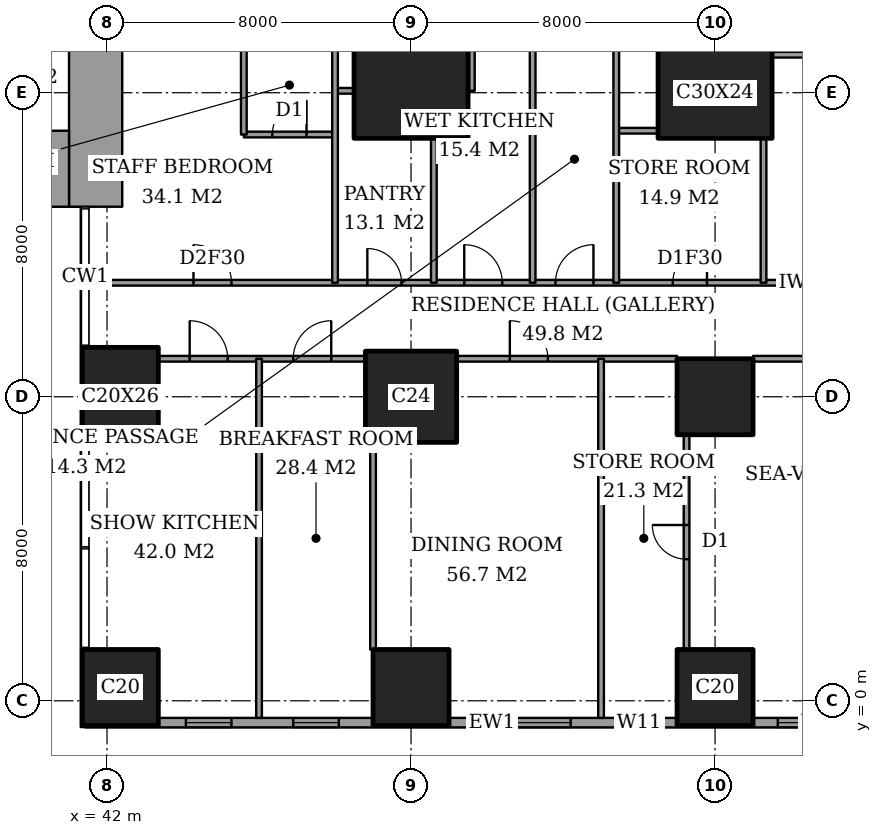
"""IFC4 building model, lengths in metres.
Left out: names, types, materials, properties, quantities, classifications, styles, units other than length and angle.
Written with IfcOpenShell. Run it as: python <this file> out.ifc"""

import sys

from ifc_helpers import new_model, si_unit, direction, frame, frame_2d, origin, origin_2d, place, context, subcontext, project, spatial, rectangle, extrude, element, fill, save


model = new_model("IFC4")
c1 = context("Model", 3, precision=1e-05, world=origin(), true_north=direction((0.0, 1.0)))
c2 = subcontext(c1, "Body", "Model", "MODEL_VIEW")
j1 = project(units=[si_unit("LENGTHUNIT", "METRE"), si_unit("PLANEANGLEUNIT", "RADIAN")], contexts=[c1])
p1 = place(None, origin())
s1 = spatial("IfcSite", under=j1, at=p1, CompositionType="ELEMENT")
p2 = place(p1, origin())
s2 = spatial("IfcBuilding", under=s1, at=p2, CompositionType="ELEMENT")
p3 = place(p2, frame((0.0, 0.0, 168.2)))
s3 = spatial("IfcBuildingStorey", under=s2, at=p3, CompositionType="ELEMENT", Elevation=168.2)
p4 = place(p3, frame((42.35, 0.35, 0.0), z_axis=(0.0, 0.0, 1.0), x_axis=(1.0, 0.0, 0.0)))
e1 = element("IfcColumn", 1, at=p4, inside=s3, PredefinedType="COLUMN", context=c2, shape_type="SweptSolid", body=[
    extrude(rectangle(XDim=2.0, YDim=2.0, at=origin_2d()), origin(), (0.0, 0.0, 1.0), 3.6),
])
p5 = place(p3, frame((42.35, 8.0, 0.0), z_axis=(0.0, 0.0, 1.0), x_axis=(1.0, 0.0, 0.0)))
e2 = element("IfcColumn", 2, at=p5, inside=s3, PredefinedType="COLUMN", context=c2, shape_type="SweptSolid", body=[
    extrude(rectangle(XDim=2.0, YDim=2.6, at=origin_2d()), origin(), (0.0, 0.0, 1.0), 3.6),
])
p6 = place(p3, frame((50.0, 0.35, 0.0), z_axis=(0.0, 0.0, 1.0), x_axis=(1.0, 0.0, 0.0)))
e3 = element("IfcColumn", 3, at=p6, inside=s3, PredefinedType="COLUMN", context=c2, shape_type="SweptSolid", body=[
    extrude(rectangle(XDim=2.0, YDim=2.0, at=origin_2d()), origin(), (0.0, 0.0, 1.0), 3.6),
])
p7 = place(p3, frame((50.0, 8.0, 0.0), z_axis=(0.0, 0.0, 1.0), x_axis=(1.0, 0.0, 0.0)))
e4 = element("IfcColumn", 4, at=p7, inside=s3, PredefinedType="COLUMN", context=c2, shape_type="SweptSolid", body=[
    extrude(rectangle(XDim=2.4, YDim=2.4, at=origin_2d()), origin(), (0.0, 0.0, 1.0), 3.6),
])
p8 = place(p3, frame((50.0, 16.0, 0.0), z_axis=(0.0, 0.0, 1.0), x_axis=(1.0, 0.0, 0.0)))
e5 = element("IfcColumn", 5, at=p8, inside=s3, PredefinedType="COLUMN", context=c2, shape_type="SweptSolid", body=[
    extrude(rectangle(XDim=3.0, YDim=2.4, at=origin_2d()), origin(), (0.0, 0.0, 1.0), 3.6),
])
for number, where, z_axis, x_axis in (
    (6, (58.0, 0.35, 0.0), (0.0, 0.0, 1.0), (1.0, 0.0, 0.0)),
    (7, (58.0, 8.0, 0.0), (0.0, 0.0, 1.0), (1.0, 0.0, 0.0)),
):
    element("IfcColumn", number, at=place(p3, frame(where, z_axis=z_axis, x_axis=x_axis)), inside=s3, PredefinedType="COLUMN", context=c2, shape_type="SweptSolid", body=[
        extrude(rectangle(XDim=2.0, YDim=2.0, at=origin_2d()), origin(), (0.0, 0.0, 1.0), 3.6),
    ])
p9 = place(p3, frame((58.0, 16.0, 0.0), z_axis=(0.0, 0.0, 1.0), x_axis=(1.0, 0.0, 0.0)))
e8 = element("IfcColumn", 8, at=p9, inside=s3, PredefinedType="COLUMN", context=c2, shape_type="SweptSolid", body=[
    extrude(rectangle(XDim=3.0, YDim=2.4, at=origin_2d()), origin(), (0.0, 0.0, 1.0), 3.6),
])
p10 = place(p3, frame((37.85, 14.0, 0.0), z_axis=(0.0, 0.0, 1.0), x_axis=(1.0, 0.0, 0.0)))
e9 = element("IfcWall", 9, at=p10, inside=s3, PredefinedType="SHEAR", context=c2, shape_type="SweptSolid", body=[
    extrude(rectangle(XDim=3.15, YDim=2.0, at=frame_2d((1.575, 0.0))), origin(), (0.0, 0.0, 1.0), 3.6),
])
p11 = place(p3, frame((41.7, 13.0, 0.0), z_axis=(0.0, 0.0, 1.0), x_axis=(0.0, 1.0, 0.0)))
e10 = element("IfcWall", 10, at=p11, inside=s3, PredefinedType="SHEAR", context=c2, shape_type="SweptSolid", body=[
    extrude(rectangle(XDim=11.85, YDim=1.4, at=frame_2d((5.925, 0.0))), origin(), (0.0, 0.0, 1.0), 3.6),
])
p12 = place(p11, frame((7.5, 0.0, 0.0)))
e11 = element("IfcOpeningElement", 11, at=p12, cuts=e10, PredefinedType="OPENING", context=c2, shape_type="SweptSolid", body=[
    extrude(rectangle(XDim=1.8, YDim=2.4, at=frame_2d((0.9, 1.2))), frame((0.0, 0.71, 0.0), z_axis=(0.0, -1.0, 0.0), x_axis=(1.0, 0.0, 0.0)), (0.0, 0.0, 1.0), 1.42),
])
p13 = place(p3, frame((41.425, -0.575, 0.0), z_axis=(0.0, 0.0, 1.0), x_axis=(1.0, 0.0, 0.0)))
e12 = element("IfcWall", 12, at=p13, inside=s3, PredefinedType="SOLIDWALL", context=c2, shape_type="SweptSolid", body=[
    extrude(rectangle(XDim=21.4, YDim=0.25, at=frame_2d((10.7, 0.0))), origin(), (0.0, 0.0, 1.0), 3.6),
])
p14 = place(p13, frame((2.65, 0.0, 0.4)))
e13 = element("IfcOpeningElement", 13, at=p14, cuts=e12, PredefinedType="OPENING", context=c2, shape_type="SweptSolid", body=[
    extrude(rectangle(XDim=1.2, YDim=2.2, at=frame_2d((0.6, 1.1))), frame((0.0, 0.135, 0.0), z_axis=(0.0, -1.0, 0.0), x_axis=(1.0, 0.0, 0.0)), (0.0, 0.0, 1.0), 0.27),
])
p15 = place(p13, frame((5.475, 0.0, 0.4)))
e14 = element("IfcOpeningElement", 14, at=p15, cuts=e12, PredefinedType="OPENING", context=c2, shape_type="SweptSolid", body=[
    extrude(rectangle(XDim=1.2, YDim=2.2, at=frame_2d((0.6, 1.1))), frame((0.0, 0.135, 0.0), z_axis=(0.0, -1.0, 0.0), x_axis=(1.0, 0.0, 0.0)), (0.0, 0.0, 1.0), 0.27),
])
p16 = place(p13, frame((10.375, 0.0, 0.4)))
e15 = element("IfcOpeningElement", 15, at=p16, cuts=e12, PredefinedType="OPENING", context=c2, shape_type="SweptSolid", body=[
    extrude(rectangle(XDim=2.4, YDim=2.2, at=frame_2d((1.2, 1.1))), frame((0.0, 0.135, 0.0), z_axis=(0.0, -1.0, 0.0), x_axis=(1.0, 0.0, 0.0)), (0.0, 0.0, 1.0), 0.27),
])
p17 = place(p13, frame((13.975, 0.0, 0.4)))
e16 = element("IfcOpeningElement", 16, at=p17, cuts=e12, PredefinedType="OPENING", context=c2, shape_type="SweptSolid", body=[
    extrude(rectangle(XDim=1.2, YDim=2.2, at=frame_2d((0.6, 1.1))), frame((0.0, 0.135, 0.0), z_axis=(0.0, -1.0, 0.0), x_axis=(1.0, 0.0, 0.0)), (0.0, 0.0, 1.0), 0.27),
])
p18 = place(p13, frame((18.225, 0.0, 0.4)))
e17 = element("IfcOpeningElement", 17, at=p18, cuts=e12, PredefinedType="OPENING", context=c2, shape_type="SweptSolid", body=[
    extrude(rectangle(XDim=2.4, YDim=2.2, at=frame_2d((1.2, 1.1))), frame((0.0, 0.135, 0.0), z_axis=(0.0, -1.0, 0.0), x_axis=(1.0, 0.0, 0.0)), (0.0, 0.0, 1.0), 0.27),
])
p19 = place(p3, frame((43.35, 9.0, 0.0), z_axis=(0.0, 0.0, 1.0), x_axis=(1.0, 0.0, 0.0)))
e18 = element("IfcWall", 18, at=p19, inside=s3, PredefinedType="PARTITIONING", context=c2, shape_type="SweptSolid", body=[
    extrude(rectangle(XDim=5.45, YDim=0.15, at=frame_2d((2.725, 0.0))), origin(), (0.0, 0.0, 1.0), 3.25),
])
p20 = place(p19, frame((3.55, 0.0, 0.0)))
e19 = element("IfcOpeningElement", 19, at=p20, cuts=e18, PredefinedType="OPENING", context=c2, shape_type="SweptSolid", body=[
    extrude(rectangle(XDim=1.0, YDim=2.1, at=frame_2d((0.5, 1.05))), frame((0.0, 0.085, 0.0), z_axis=(0.0, -1.0, 0.0), x_axis=(1.0, 0.0, 0.0)), (0.0, 0.0, 1.0), 0.17),
])
p21 = place(p19, frame((0.825, 0.0, 0.0)))
e20 = element("IfcOpeningElement", 20, at=p21, cuts=e18, PredefinedType="OPENING", context=c2, shape_type="SweptSolid", body=[
    extrude(rectangle(XDim=1.0, YDim=2.1, at=frame_2d((0.5, 1.05))), frame((0.0, 0.085, 0.0), z_axis=(0.0, -1.0, 0.0), x_axis=(1.0, 0.0, 0.0)), (0.0, 0.0, 1.0), 0.17),
])
p22 = place(p3, frame((51.2, 9.0, 0.0), z_axis=(0.0, 0.0, 1.0), x_axis=(1.0, 0.0, 0.0)))
e21 = element("IfcWall", 21, at=p22, inside=s3, PredefinedType="PARTITIONING", context=c2, shape_type="SweptSolid", body=[
    extrude(rectangle(XDim=5.8, YDim=0.15, at=frame_2d((2.9, 0.0))), origin(), (0.0, 0.0, 1.0), 3.25),
])
p23 = place(p22, frame((1.4, 0.0, 0.0)))
e22 = element("IfcOpeningElement", 22, at=p23, cuts=e21, PredefinedType="OPENING", context=c2, shape_type="SweptSolid", body=[
    extrude(rectangle(XDim=1.0, YDim=2.1, at=frame_2d((0.5, 1.05))), frame((0.0, 0.085, 0.0), z_axis=(0.0, -1.0, 0.0), x_axis=(1.0, 0.0, 0.0)), (0.0, 0.0, 1.0), 0.17),
])
p24 = place(p3, frame((59.0, 9.0, 0.0), z_axis=(0.0, 0.0, 1.0), x_axis=(1.0, 0.0, 0.0)))
e23 = element("IfcWall", 23, at=p24, inside=s3, PredefinedType="PARTITIONING", context=c2, shape_type="SweptSolid", body=[
    extrude(rectangle(XDim=5.65, YDim=0.15, at=frame_2d((2.825, 0.0))), origin(), (0.0, 0.0, 1.0), 3.25),
])
p25 = place(p24, frame((2.325, 0.0, 0.0)))
e24 = element("IfcOpeningElement", 24, at=p25, cuts=e23, PredefinedType="OPENING", context=c2, shape_type="SweptSolid", body=[
    extrude(rectangle(XDim=1.0, YDim=2.1, at=frame_2d((0.5, 1.05))), frame((0.0, 0.085, 0.0), z_axis=(0.0, -1.0, 0.0), x_axis=(1.0, 0.0, 0.0)), (0.0, 0.0, 1.0), 0.17),
])
p26 = place(p3, frame((41.439, 11.0, 0.0), z_axis=(0.0, 0.0, 1.0), x_axis=(1.0, 0.0, 0.0)))
e25 = element("IfcWall", 25, at=p26, inside=s3, PredefinedType="PARTITIONING", context=c2, shape_type="SweptSolid", body=[
    extrude(rectangle(XDim=25.011, YDim=0.15, at=frame_2d((12.505, 0.0))), origin(), (0.0, 0.0, 1.0), 3.25),
])
p27 = place(p26, frame((12.361, 0.0, 0.0)))
e26 = element("IfcOpeningElement", 26, at=p27, cuts=e25, PredefinedType="OPENING", context=c2, shape_type="SweptSolid", body=[
    extrude(rectangle(XDim=1.0, YDim=2.1, at=frame_2d((0.5, 1.05))), frame((0.0, 0.085, 0.0), z_axis=(0.0, -1.0, 0.0), x_axis=(1.0, 0.0, 0.0)), (0.0, 0.0, 1.0), 0.17),
])
p28 = place(p26, frame((20.924, 0.0, 0.0)))
e27 = element("IfcOpeningElement", 27, at=p28, cuts=e25, PredefinedType="OPENING", context=c2, shape_type="SweptSolid", body=[
    extrude(rectangle(XDim=1.0, YDim=2.1, at=frame_2d((0.5, 1.05))), frame((0.0, 0.085, 0.0), z_axis=(0.0, -1.0, 0.0), x_axis=(1.0, 0.0, 0.0)), (0.0, 0.0, 1.0), 0.17),
])
p29 = place(p26, frame((15.448, 0.0, 0.0)))
e28 = element("IfcOpeningElement", 28, at=p29, cuts=e25, PredefinedType="OPENING", context=c2, shape_type="SweptSolid", body=[
    extrude(rectangle(XDim=0.9, YDim=2.1, at=frame_2d((0.45, 1.05))), frame((0.0, 0.085, 0.0), z_axis=(0.0, -1.0, 0.0), x_axis=(1.0, 0.0, 0.0)), (0.0, 0.0, 1.0), 0.17),
])
p30 = place(p26, frame((9.961, 0.0, 0.0)))
e29 = element("IfcOpeningElement", 29, at=p30, cuts=e25, PredefinedType="OPENING", context=c2, shape_type="SweptSolid", body=[
    extrude(rectangle(XDim=1.0, YDim=2.1, at=frame_2d((0.5, 1.05))), frame((0.0, 0.085, 0.0), z_axis=(0.0, -1.0, 0.0), x_axis=(1.0, 0.0, 0.0)), (0.0, 0.0, 1.0), 0.17),
])
p31 = place(p26, frame((7.411, 0.0, 0.0)))
e30 = element("IfcOpeningElement", 30, at=p31, cuts=e25, PredefinedType="OPENING", context=c2, shape_type="SweptSolid", body=[
    extrude(rectangle(XDim=0.9, YDim=2.1, at=frame_2d((0.45, 1.05))), frame((0.0, 0.085, 0.0), z_axis=(0.0, -1.0, 0.0), x_axis=(1.0, 0.0, 0.0)), (0.0, 0.0, 1.0), 0.17),
])
p32 = place(p26, frame((2.836, 0.0, 0.0)))
e31 = element("IfcOpeningElement", 31, at=p32, cuts=e25, PredefinedType="OPENING", context=c2, shape_type="SweptSolid", body=[
    extrude(rectangle(XDim=1.0, YDim=2.1, at=frame_2d((0.5, 1.05))), frame((0.0, 0.085, 0.0), z_axis=(0.0, -1.0, 0.0), x_axis=(1.0, 0.0, 0.0)), (0.0, 0.0, 1.0), 0.17),
])
p33 = place(p3, frame((45.6, 14.9, 0.0), z_axis=(0.0, 0.0, 1.0), x_axis=(1.0, 0.0, 0.0)))
e32 = element("IfcWall", 32, at=p33, inside=s3, PredefinedType="PARTITIONING", context=c2, shape_type="SweptSolid", body=[
    extrude(rectangle(XDim=2.4, YDim=0.15, at=frame_2d((1.2, 0.0))), origin(), (0.0, 0.0, 1.0), 3.25),
])
p34 = place(p33, frame((0.75, 0.0, 0.0)))
e33 = element("IfcOpeningElement", 33, at=p34, cuts=e32, PredefinedType="OPENING", context=c2, shape_type="SweptSolid", body=[
    extrude(rectangle(XDim=0.9, YDim=2.1, at=frame_2d((0.45, 1.05))), frame((0.0, 0.085, 0.0), z_axis=(0.0, -1.0, 0.0), x_axis=(1.0, 0.0, 0.0)), (0.0, 0.0, 1.0), 0.17),
])
p35 = place(p3, frame((55.4, 15.0, 0.0), z_axis=(0.0, 0.0, 1.0), x_axis=(1.0, 0.0, 0.0)))
e34 = element("IfcWall", 34, at=p35, inside=s3, PredefinedType="PARTITIONING", context=c2, shape_type="SweptSolid", body=[
    extrude(rectangle(XDim=1.1, YDim=0.15, at=frame_2d((0.55, 0.0))), origin(), (0.0, 0.0, 1.0), 3.25),
])
p36 = place(p3, frame((48.0, 16.05, 0.0), z_axis=(0.0, 0.0, 1.0), x_axis=(1.0, 0.0, 0.0)))
e35 = element("IfcWall", 35, at=p36, inside=s3, PredefinedType="PARTITIONING", context=c2, shape_type="SweptSolid", body=[
    extrude(rectangle(XDim=0.5, YDim=0.15, at=frame_2d((0.25, 0.0))), origin(), (0.0, 0.0, 1.0), 3.25),
])
p37 = place(p3, frame((59.5, 17.0, 0.0), z_axis=(0.0, 0.0, 1.0), x_axis=(1.0, 0.0, 0.0)))
e36 = element("IfcWall", 36, at=p37, inside=s3, PredefinedType="PARTITIONING", context=c2, shape_type="SweptSolid", body=[
    extrude(rectangle(XDim=5.15, YDim=0.15, at=frame_2d((2.575, 0.0))), origin(), (0.0, 0.0, 1.0), 3.25),
])
p38 = place(p3, frame((45.6, 14.9, 0.0), z_axis=(0.0, 0.0, 1.0), x_axis=(0.0, 1.0, 0.0)))
e37 = element("IfcWall", 37, at=p38, inside=s3, PredefinedType="PARTITIONING", context=c2, shape_type="SweptSolid", body=[
    extrude(rectangle(XDim=2.6, YDim=0.15, at=frame_2d((1.3, 0.0))), origin(), (0.0, 0.0, 1.0), 3.25),
])
p39 = place(p3, frame((46.0, -0.45, 0.0), z_axis=(0.0, 0.0, 1.0), x_axis=(0.0, 1.0, 0.0)))
e38 = element("IfcWall", 38, at=p39, inside=s3, PredefinedType="PARTITIONING", context=c2, shape_type="SweptSolid", body=[
    extrude(rectangle(XDim=9.45, YDim=0.15, at=frame_2d((4.725, 0.0))), origin(), (0.0, 0.0, 1.0), 3.25),
])
p40 = place(p3, frame((48.0, 11.0, 0.0), z_axis=(0.0, 0.0, 1.0), x_axis=(0.0, 1.0, 0.0)))
e39 = element("IfcWall", 39, at=p40, inside=s3, PredefinedType="PARTITIONING", context=c2, shape_type="SweptSolid", body=[
    extrude(rectangle(XDim=6.5, YDim=0.15, at=frame_2d((3.25, 0.0))), origin(), (0.0, 0.0, 1.0), 3.25),
])
p41 = place(p3, frame((49.0, 1.35, 0.0), z_axis=(0.0, 0.0, 1.0), x_axis=(0.0, 1.0, 0.0)))
e40 = element("IfcWall", 40, at=p41, inside=s3, PredefinedType="PARTITIONING", context=c2, shape_type="SweptSolid", body=[
    extrude(rectangle(XDim=5.45, YDim=0.15, at=frame_2d((2.725, 0.0))), origin(), (0.0, 0.0, 1.0), 3.25),
])
p42 = place(p3, frame((50.6, 11.0, 0.0), z_axis=(0.0, 0.0, 1.0), x_axis=(0.0, 1.0, 0.0)))
e41 = element("IfcWall", 41, at=p42, inside=s3, PredefinedType="PARTITIONING", context=c2, shape_type="SweptSolid", body=[
    extrude(rectangle(XDim=3.8, YDim=0.15, at=frame_2d((1.9, 0.0))), origin(), (0.0, 0.0, 1.0), 3.25),
])
p43 = place(p3, frame((51.6, 16.05, 0.0), z_axis=(0.0, 0.0, 1.0), x_axis=(0.0, 1.0, 0.0)))
e42 = element("IfcWall", 42, at=p43, inside=s3, PredefinedType="PARTITIONING", context=c2, shape_type="SweptSolid", body=[
    extrude(rectangle(XDim=1.45, YDim=0.15, at=frame_2d((0.725, 0.0))), origin(), (0.0, 0.0, 1.0), 3.25),
])
p44 = place(p3, frame((53.2, 11.0, 0.0), z_axis=(0.0, 0.0, 1.0), x_axis=(0.0, 1.0, 0.0)))
e43 = element("IfcWall", 43, at=p44, inside=s3, PredefinedType="PARTITIONING", context=c2, shape_type="SweptSolid", body=[
    extrude(rectangle(XDim=6.5, YDim=0.15, at=frame_2d((3.25, 0.0))), origin(), (0.0, 0.0, 1.0), 3.25),
])
p45 = place(p3, frame((55.0, -0.45, 0.0), z_axis=(0.0, 0.0, 1.0), x_axis=(0.0, 1.0, 0.0)))
e44 = element("IfcWall", 44, at=p45, inside=s3, PredefinedType="PARTITIONING", context=c2, shape_type="SweptSolid", body=[
    extrude(rectangle(XDim=9.45, YDim=0.15, at=frame_2d((4.725, 0.0))), origin(), (0.0, 0.0, 1.0), 3.25),
])
p46 = place(p3, frame((55.4, 11.0, 0.0), z_axis=(0.0, 0.0, 1.0), x_axis=(0.0, 1.0, 0.0)))
e45 = element("IfcWall", 45, at=p46, inside=s3, PredefinedType="PARTITIONING", context=c2, shape_type="SweptSolid", body=[
    extrude(rectangle(XDim=10.6, YDim=0.15, at=frame_2d((5.3, 0.0))), origin(), (0.0, 0.0, 1.0), 3.25),
])
p47 = place(p46, frame((8.05, 0.0, 0.0)))
e46 = element("IfcOpeningElement", 46, at=p47, cuts=e45, PredefinedType="OPENING", context=c2, shape_type="SweptSolid", body=[
    extrude(rectangle(XDim=1.0, YDim=2.1, at=frame_2d((0.5, 1.05))), frame((0.0, 0.085, 0.0), z_axis=(0.0, -1.0, 0.0), x_axis=(1.0, 0.0, 0.0)), (0.0, 0.0, 1.0), 0.17),
])
p48 = place(p3, frame((57.25, 1.35, 0.0), z_axis=(0.0, 0.0, 1.0), x_axis=(0.0, 1.0, 0.0)))
e47 = element("IfcWall", 47, at=p48, inside=s3, PredefinedType="PARTITIONING", context=c2, shape_type="SweptSolid", body=[
    extrude(rectangle(XDim=5.65, YDim=0.15, at=frame_2d((2.825, 0.0))), origin(), (0.0, 0.0, 1.0), 3.25),
])
p49 = place(p48, frame((2.375, 0.0, 0.0)))
e48 = element("IfcOpeningElement", 48, at=p49, cuts=e47, PredefinedType="OPENING", context=c2, shape_type="SweptSolid", body=[
    extrude(rectangle(XDim=0.9, YDim=2.1, at=frame_2d((0.45, 1.05))), frame((0.0, 0.085, 0.0), z_axis=(0.0, -1.0, 0.0), x_axis=(1.0, 0.0, 0.0)), (0.0, 0.0, 1.0), 0.17),
])
p50 = place(p3, frame((59.275, 11.0, 0.0), z_axis=(0.0, 0.0, 1.0), x_axis=(0.0, 1.0, 0.0)))
e49 = element("IfcWall", 49, at=p50, inside=s3, PredefinedType="PARTITIONING", context=c2, shape_type="SweptSolid", body=[
    extrude(rectangle(XDim=3.8, YDim=0.15, at=frame_2d((1.9, 0.0))), origin(), (0.0, 0.0, 1.0), 3.25),
])
p51 = place(p14, origin())
e50 = element("IfcWindow", 50, at=p51, inside=s3, PartitioningType="SINGLE_PANEL", PredefinedType="WINDOW", context=c2, shape_type="SweptSolid", body=[
    extrude(rectangle(XDim=1.2, YDim=2.2, at=frame_2d((0.6, 1.1))), frame((0.0, 0.03, 0.0), z_axis=(0.0, -1.0, 0.0), x_axis=(1.0, 0.0, 0.0)), (0.0, 0.0, 1.0), 0.06),
])
fill(e13, e50)
p52 = place(p15, origin())
e51 = element("IfcWindow", 51, at=p52, inside=s3, PartitioningType="SINGLE_PANEL", PredefinedType="WINDOW", context=c2, shape_type="SweptSolid", body=[
    extrude(rectangle(XDim=1.2, YDim=2.2, at=frame_2d((0.6, 1.1))), frame((0.0, 0.03, 0.0), z_axis=(0.0, -1.0, 0.0), x_axis=(1.0, 0.0, 0.0)), (0.0, 0.0, 1.0), 0.06),
])
fill(e14, e51)
p53 = place(p16, origin())
e52 = element("IfcWindow", 52, at=p53, inside=s3, PartitioningType="SINGLE_PANEL", PredefinedType="WINDOW", context=c2, shape_type="SweptSolid", body=[
    extrude(rectangle(XDim=2.4, YDim=2.2, at=frame_2d((1.2, 1.1))), frame((0.0, 0.03, 0.0), z_axis=(0.0, -1.0, 0.0), x_axis=(1.0, 0.0, 0.0)), (0.0, 0.0, 1.0), 0.06),
])
fill(e15, e52)
p54 = place(p17, origin())
e53 = element("IfcWindow", 53, at=p54, inside=s3, PartitioningType="SINGLE_PANEL", PredefinedType="WINDOW", context=c2, shape_type="SweptSolid", body=[
    extrude(rectangle(XDim=1.2, YDim=2.2, at=frame_2d((0.6, 1.1))), frame((0.0, 0.03, 0.0), z_axis=(0.0, -1.0, 0.0), x_axis=(1.0, 0.0, 0.0)), (0.0, 0.0, 1.0), 0.06),
])
fill(e16, e53)
p55 = place(p18, origin())
e54 = element("IfcWindow", 54, at=p55, inside=s3, PartitioningType="SINGLE_PANEL", PredefinedType="WINDOW", context=c2, shape_type="SweptSolid", body=[
    extrude(rectangle(XDim=2.4, YDim=2.2, at=frame_2d((1.2, 1.1))), frame((0.0, 0.03, 0.0), z_axis=(0.0, -1.0, 0.0), x_axis=(1.0, 0.0, 0.0)), (0.0, 0.0, 1.0), 0.06),
])
fill(e17, e54)
p56 = place(p49, origin())
e55 = element("IfcDoor", 55, at=p56, inside=s3, OperationType="SINGLE_SWING_LEFT", PredefinedType="DOOR", context=c2, shape_type="SweptSolid", body=[
    extrude(rectangle(XDim=0.9, YDim=2.1, at=frame_2d((0.45, 1.05))), frame((0.0, 0.025, 0.0), z_axis=(0.0, -1.0, 0.0), x_axis=(1.0, 0.0, 0.0)), (0.0, 0.0, 1.0), 0.05),
])
fill(e48, e55)
p57 = place(p23, origin())
e56 = element("IfcDoor", 56, at=p57, inside=s3, OperationType="SINGLE_SWING_RIGHT", PredefinedType="DOOR", context=c2, shape_type="SweptSolid", body=[
    extrude(rectangle(XDim=1.0, YDim=2.1, at=frame_2d((0.5, 1.05))), frame((0.0, 0.025, 0.0), z_axis=(0.0, -1.0, 0.0), x_axis=(1.0, 0.0, 0.0)), (0.0, 0.0, 1.0), 0.05),
])
fill(e22, e56)
p58 = place(p20, origin())
e57 = element("IfcDoor", 57, at=p58, inside=s3, OperationType="SINGLE_SWING_LEFT", PredefinedType="DOOR", context=c2, shape_type="SweptSolid", body=[
    extrude(rectangle(XDim=1.0, YDim=2.1, at=frame_2d((0.5, 1.05))), frame((0.0, 0.025, 0.0), z_axis=(0.0, -1.0, 0.0), x_axis=(1.0, 0.0, 0.0)), (0.0, 0.0, 1.0), 0.05),
])
fill(e19, e57)
p59 = place(p21, origin())
e58 = element("IfcDoor", 58, at=p59, inside=s3, OperationType="SINGLE_SWING_RIGHT", PredefinedType="DOOR", context=c2, shape_type="SweptSolid", body=[
    extrude(rectangle(XDim=1.0, YDim=2.1, at=frame_2d((0.5, 1.05))), frame((0.0, 0.025, 0.0), z_axis=(0.0, -1.0, 0.0), x_axis=(1.0, 0.0, 0.0)), (0.0, 0.0, 1.0), 0.05),
])
fill(e20, e58)
p60 = place(p27, origin())
e59 = element("IfcDoor", 59, at=p60, inside=s3, OperationType="SINGLE_SWING_LEFT", PredefinedType="DOOR", context=c2, shape_type="SweptSolid", body=[
    extrude(rectangle(XDim=1.0, YDim=2.1, at=frame_2d((0.5, 1.05))), frame((0.0, 0.025, 0.0), z_axis=(0.0, -1.0, 0.0), x_axis=(1.0, 0.0, 0.0)), (0.0, 0.0, 1.0), 0.05),
])
fill(e26, e59)
p61 = place(p29, origin())
e60 = element("IfcDoor", 60, at=p61, inside=s3, OperationType="SINGLE_SWING_LEFT", PredefinedType="DOOR", context=c2, shape_type="SweptSolid", body=[
    extrude(rectangle(XDim=0.9, YDim=2.1, at=frame_2d((0.45, 1.05))), frame((0.0, 0.025, 0.0), z_axis=(0.0, -1.0, 0.0), x_axis=(1.0, 0.0, 0.0)), (0.0, 0.0, 1.0), 0.05),
])
fill(e28, e60)
p62 = place(p30, origin())
e61 = element("IfcDoor", 61, at=p62, inside=s3, OperationType="SINGLE_SWING_RIGHT", PredefinedType="DOOR", context=c2, shape_type="SweptSolid", body=[
    extrude(rectangle(XDim=1.0, YDim=2.1, at=frame_2d((0.5, 1.05))), frame((0.0, 0.025, 0.0), z_axis=(0.0, -1.0, 0.0), x_axis=(1.0, 0.0, 0.0)), (0.0, 0.0, 1.0), 0.05),
])
fill(e29, e61)
p63 = place(p31, origin())
e62 = element("IfcDoor", 62, at=p63, inside=s3, OperationType="SINGLE_SWING_RIGHT", PredefinedType="DOOR", context=c2, shape_type="SweptSolid", body=[
    extrude(rectangle(XDim=0.9, YDim=2.1, at=frame_2d((0.45, 1.05))), frame((0.0, 0.025, 0.0), z_axis=(0.0, -1.0, 0.0), x_axis=(1.0, 0.0, 0.0)), (0.0, 0.0, 1.0), 0.05),
])
fill(e30, e62)
p64 = place(p34, origin())
e63 = element("IfcDoor", 63, at=p64, inside=s3, OperationType="SINGLE_SWING_LEFT", PredefinedType="DOOR", context=c2, shape_type="SweptSolid", body=[
    extrude(rectangle(XDim=0.9, YDim=2.1, at=frame_2d((0.45, 1.05))), frame((0.0, 0.025, 0.0), z_axis=(0.0, -1.0, 0.0), x_axis=(1.0, 0.0, 0.0)), (0.0, 0.0, 1.0), 0.05),
])
fill(e33, e63)
p65 = place(p32, origin())
e64 = element("IfcDoor", 64, at=p65, inside=s3, OperationType="SINGLE_SWING_RIGHT", PredefinedType="DOOR", context=c2, shape_type="SweptSolid", body=[
    extrude(rectangle(XDim=1.0, YDim=2.1, at=frame_2d((0.5, 1.05))), frame((0.0, 0.025, 0.0), z_axis=(0.0, -1.0, 0.0), x_axis=(1.0, 0.0, 0.0)), (0.0, 0.0, 1.0), 0.05),
])
fill(e31, e64)
save(model, sys.argv[1])
